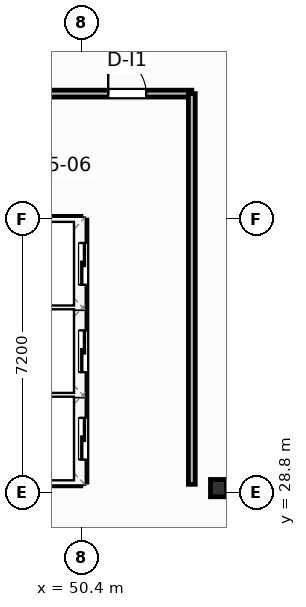
"""IFC4 building model, lengths in metres.
Left out: names, types, materials, properties, quantities, classifications, styles, units other than length and angle.
Written with IfcOpenShell. Run it as: python <this file> out.ifc"""

import sys

from ifc_helpers import new_model, si_unit, direction, frame, frame_2d, origin, origin_2d, place, context, subcontext, project, spatial, rectangle, i_section, extrude, element, fill, save


model = new_model("IFC4")
c1 = context("Model", 3, precision=1e-05, world=origin(), true_north=direction((0.0, 1.0)))
c2 = subcontext(c1, "Body", "Model", "MODEL_VIEW")
j1 = project(units=[si_unit("LENGTHUNIT", "METRE"), si_unit("PLANEANGLEUNIT", "RADIAN")], contexts=[c1])
p1 = place(None, origin())
s1 = spatial("IfcSite", under=j1, at=p1, CompositionType="ELEMENT")
p2 = place(p1, origin())
s2 = spatial("IfcBuilding", under=s1, at=p2, CompositionType="ELEMENT")
p3 = place(p2, frame((0.0, 0.0, 162.4)))
s3 = spatial("IfcBuildingStorey", under=s2, at=p3, CompositionType="ELEMENT", Elevation=162.4)
p4 = place(p3, frame((54.0, 28.92, 0.0), z_axis=(0.0, 0.0, 1.0), x_axis=(1.0, 0.0, 0.0)))
e1 = element("IfcColumn", 1, at=p4, inside=s3, PredefinedType="COLUMN", context=c2, shape_type="SweptSolid", body=[
    extrude(i_section(OverallWidth=0.418, OverallDepth=0.455, WebThickness=0.042, FlangeThickness=0.068, FilletRadius=0.025, at=origin_2d()), origin(), (0.0, 0.0, 1.0), 4.8),
])
p5 = place(p3, frame((20.0, 39.3, 0.0), z_axis=(0.0, 0.0, 1.0), x_axis=(1.0, 0.0, 0.0)))
e2 = element("IfcWall", 2, at=p5, inside=s3, PredefinedType="PARTITIONING", context=c2, shape_type="SweptSolid", body=[
    extrude(rectangle(XDim=33.3, YDim=0.18, at=frame_2d((16.65, 0.0))), origin(), (0.0, 0.0, 1.0), 3.762),
])
p6 = place(p5, frame((31.1, 0.0, 0.0)))
e3 = element("IfcOpeningElement", 3, at=p6, cuts=e2, PredefinedType="OPENING", context=c2, shape_type="SweptSolid", body=[
    extrude(rectangle(XDim=1.0, YDim=2.05, at=frame_2d((0.5, 1.025))), frame((0.0, 0.1, 0.0), z_axis=(0.0, -1.0, 0.0), x_axis=(1.0, 0.0, 0.0)), (0.0, 0.0, 1.0), 0.2),
])
p7 = place(p3, frame((53.3, 29.02, 0.0), z_axis=(0.0, 0.0, 1.0), x_axis=(0.0, 1.0, 0.0)))
e4 = element("IfcWall", 4, at=p7, inside=s3, PredefinedType="PARTITIONING", context=c2, shape_type="SweptSolid", body=[
    extrude(rectangle(XDim=10.28, YDim=0.18, at=frame_2d((5.14, 0.0))), origin(), (0.0, 0.0, 1.0), 4.55),
])
for number, where, z_axis, x_axis in (
    (5, (48.32, 31.375, 0.0), (0.0, 0.0, 1.0), (1.0, 0.0, 0.0)),
    (6, (48.32, 33.675, 0.0), (0.0, 0.0, 1.0), (1.0, 0.0, 0.0)),
):
    element("IfcWall", number, at=place(p3, frame(where, z_axis=z_axis, x_axis=x_axis)), inside=s3, PredefinedType="PARTITIONING", context=c2, shape_type="SweptSolid", body=[
        extrude(rectangle(XDim=2.06, YDim=0.2, at=frame_2d((1.03, 0.0))), origin(), (0.0, 0.0, 1.0), 4.55),
    ])
p8 = place(p3, frame((48.32, 29.08, 0.0), z_axis=(0.0, 0.0, 1.0), x_axis=(1.0, 0.0, 0.0)))
e7 = element("IfcWall", 7, at=p8, inside=s3, PredefinedType="PARTITIONING", context=c2, shape_type="SweptSolid", body=[
    extrude(rectangle(XDim=2.06, YDim=0.2, at=frame_2d((1.03, 0.0))), origin(), (0.0, 0.0, 1.0), 3.762),
])
p9 = place(p3, frame((48.32, 35.97, 0.0), z_axis=(0.0, 0.0, 1.0), x_axis=(1.0, 0.0, 0.0)))
e8 = element("IfcWall", 8, at=p9, inside=s3, PredefinedType="PARTITIONING", context=c2, shape_type="SweptSolid", body=[
    extrude(rectangle(XDim=2.06, YDim=0.2, at=frame_2d((1.03, 0.0))), origin(), (0.0, 0.0, 1.0), 4.55),
])
p10 = place(p3, frame((50.44, 29.08, 0.0), z_axis=(0.0, 0.0, 1.0), x_axis=(0.0, 1.0, 0.0)))
e9 = element("IfcWall", 9, at=p10, inside=s3, PredefinedType="PARTITIONING", context=c2, shape_type="SweptSolid", body=[
    extrude(rectangle(XDim=6.89, YDim=0.2, at=frame_2d((3.445, 0.0))), origin(), (0.0, 0.0, 1.0), 4.55),
])
p11 = place(p10, frame((0.59, 0.0, 0.0)))
e10 = element("IfcOpeningElement", 10, at=p11, cuts=e9, PredefinedType="OPENING", context=c2, shape_type="SweptSolid", body=[
    extrude(rectangle(XDim=1.1, YDim=2.15, at=frame_2d((0.55, 1.075))), frame((0.0, 0.11, 0.0), z_axis=(0.0, -1.0, 0.0), x_axis=(1.0, 0.0, 0.0)), (0.0, 0.0, 1.0), 0.22),
])
p12 = place(p10, frame((2.89, 0.0, 0.0)))
e11 = element("IfcOpeningElement", 11, at=p12, cuts=e9, PredefinedType="OPENING", context=c2, shape_type="SweptSolid", body=[
    extrude(rectangle(XDim=1.1, YDim=2.15, at=frame_2d((0.55, 1.075))), frame((0.0, 0.11, 0.0), z_axis=(0.0, -1.0, 0.0), x_axis=(1.0, 0.0, 0.0)), (0.0, 0.0, 1.0), 0.22),
])
p13 = place(p10, frame((5.19, 0.0, 0.0)))
e12 = element("IfcOpeningElement", 12, at=p13, cuts=e9, PredefinedType="OPENING", context=c2, shape_type="SweptSolid", body=[
    extrude(rectangle(XDim=1.1, YDim=2.15, at=frame_2d((0.55, 1.075))), frame((0.0, 0.11, 0.0), z_axis=(0.0, -1.0, 0.0), x_axis=(1.0, 0.0, 0.0)), (0.0, 0.0, 1.0), 0.22),
])
p14 = place(p6, origin())
e13 = element("IfcDoor", 13, at=p14, inside=s3, OperationType="SINGLE_SWING_LEFT", PredefinedType="DOOR", context=c2, shape_type="SweptSolid", body=[
    extrude(rectangle(XDim=1.0, YDim=2.05, at=frame_2d((0.5, 1.025))), frame((0.0, 0.025, 0.0), z_axis=(0.0, -1.0, 0.0), x_axis=(1.0, 0.0, 0.0)), (0.0, 0.0, 1.0), 0.05),
])
fill(e3, e13)
p15 = place(p11, origin())
e14 = element("IfcDoor", 14, at=p15, inside=s3, OperationType="SLIDING_TO_LEFT", PredefinedType="DOOR", context=c2, shape_type="SweptSolid", body=[
    extrude(rectangle(XDim=1.1, YDim=2.15, at=frame_2d((0.55, 1.075))), frame((0.0, 0.025, 0.0), z_axis=(0.0, -1.0, 0.0), x_axis=(1.0, 0.0, 0.0)), (0.0, 0.0, 1.0), 0.05),
])
fill(e10, e14)
p16 = place(p12, origin())
e15 = element("IfcDoor", 15, at=p16, inside=s3, OperationType="SLIDING_TO_LEFT", PredefinedType="DOOR", context=c2, shape_type="SweptSolid", body=[
    extrude(rectangle(XDim=1.1, YDim=2.15, at=frame_2d((0.55, 1.075))), frame((0.0, 0.025, 0.0), z_axis=(0.0, -1.0, 0.0), x_axis=(1.0, 0.0, 0.0)), (0.0, 0.0, 1.0), 0.05),
])
fill(e11, e15)
p17 = place(p13, origin())
e16 = element("IfcDoor", 16, at=p17, inside=s3, OperationType="SLIDING_TO_LEFT", PredefinedType="DOOR", context=c2, shape_type="SweptSolid", body=[
    extrude(rectangle(XDim=1.1, YDim=2.15, at=frame_2d((0.55, 1.075))), frame((0.0, 0.025, 0.0), z_axis=(0.0, -1.0, 0.0), x_axis=(1.0, 0.0, 0.0)), (0.0, 0.0, 1.0), 0.05),
])
fill(e12, e16)
save(model, sys.argv[1])
